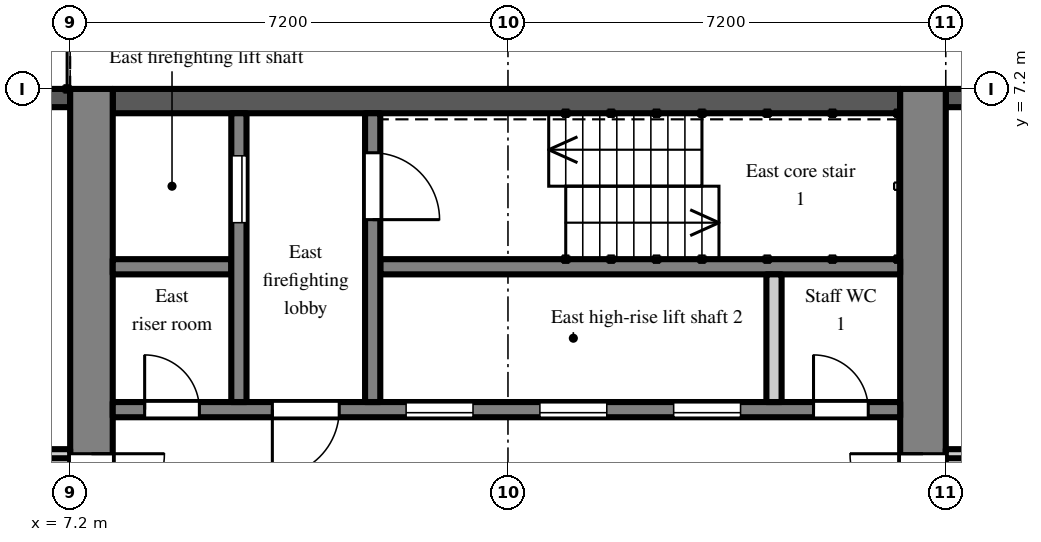
"""IFC4 building model, lengths in metres.
Left out: names, types, materials, properties, quantities, classifications, styles, units other than length and angle.
Written with IfcOpenShell. Run it as: python <this file> out.ifc"""

import sys

from ifc_helpers import new_model, si_unit, direction, frame, frame_2d, origin, place, context, subcontext, project, spatial, rectangle, extrude, element, fill, save


model = new_model("IFC4")
c1 = context("Model", 3, precision=1e-05, world=origin(), true_north=direction((0.0, 1.0)))
c2 = subcontext(c1, "Body", "Model", "MODEL_VIEW")
j1 = project(units=[si_unit("LENGTHUNIT", "METRE"), si_unit("PLANEANGLEUNIT", "RADIAN")], contexts=[c1])
p1 = place(None, origin())
s1 = spatial("IfcSite", under=j1, at=p1, CompositionType="ELEMENT")
p2 = place(p1, origin())
s2 = spatial("IfcBuilding", under=s1, at=p2, CompositionType="ELEMENT")
p3 = place(p2, frame((0.0, 0.0, 198.9)))
s3 = spatial("IfcBuildingStorey", under=s2, at=p3, CompositionType="ELEMENT", Elevation=198.9)
p4 = place(p3, frame((24.3, 7.05, 0.0), z_axis=(0.0, 0.0, 1.0), x_axis=(-1.0, 0.0, 0.0)))
e1 = element("IfcWall", 1, at=p4, inside=s3, PredefinedType="SOLIDWALL", context=c2, shape_type="SweptSolid", body=[
    extrude(rectangle(XDim=2.7, YDim=0.3, at=frame_2d((1.35, 0.0))), origin(), (0.0, 0.0, 1.0), 2.3),
])
p5 = place(p3, frame((7.2, 7.05, 0.0), z_axis=(0.0, 0.0, 1.0), x_axis=(-1.0, 0.0, 0.0)))
e2 = element("IfcWall", 2, at=p5, inside=s3, PredefinedType="SOLIDWALL", context=c2, shape_type="SweptSolid", body=[
    extrude(rectangle(XDim=3.0, YDim=0.3, at=frame_2d((1.5, 0.0))), origin(), (0.0, 0.0, 1.0), 2.3),
])
p6 = place(p3, frame((7.55, -7.2, 0.0), z_axis=(0.0, 0.0, 1.0), x_axis=(0.0, 1.0, 0.0)))
e3 = element("IfcWall", 3, at=p6, inside=s3, PredefinedType="SHEAR", context=c2, shape_type="SweptSolid", body=[
    extrude(rectangle(XDim=14.4, YDim=0.7, at=frame_2d((7.2, 0.0))), origin(), (0.0, 0.0, 1.0), 2.6),
])
p7 = place(p6, frame((6.0, 0.0, 0.0)))
e4 = element("IfcOpeningElement", 4, at=p7, cuts=e3, PredefinedType="OPENING", context=c2, shape_type="SweptSolid", body=[
    extrude(rectangle(XDim=2.4, YDim=2.2, at=frame_2d((1.2, 1.1))), frame((0.0, 0.36, 0.0), z_axis=(0.0, -1.0, 0.0), x_axis=(1.0, 0.0, 0.0)), (0.0, 0.0, 1.0), 0.72),
])
p8 = place(p3, frame((21.225, -7.2, 0.0), z_axis=(0.0, 0.0, 1.0), x_axis=(0.0, 1.0, 0.0)))
e5 = element("IfcWall", 5, at=p8, inside=s3, PredefinedType="SHEAR", context=c2, shape_type="SweptSolid", body=[
    extrude(rectangle(XDim=14.4, YDim=0.75, at=frame_2d((7.2, 0.0))), origin(), (0.0, 0.0, 1.0), 2.6),
])
p9 = place(p8, frame((6.0, 0.0, 0.0)))
e6 = element("IfcOpeningElement", 6, at=p9, cuts=e5, PredefinedType="OPENING", context=c2, shape_type="SweptSolid", body=[
    extrude(rectangle(XDim=2.4, YDim=2.2, at=frame_2d((1.2, 1.1))), frame((0.0, 0.385, 0.0), z_axis=(0.0, -1.0, 0.0), x_axis=(1.0, 0.0, 0.0)), (0.0, 0.0, 1.0), 0.77),
])
p10 = place(p3, frame((7.9, 7.0, 0.0), z_axis=(0.0, 0.0, 1.0), x_axis=(1.0, 0.0, 0.0)))
e7 = element("IfcWall", 7, at=p10, inside=s3, PredefinedType="SHEAR", context=c2, shape_type="SweptSolid", body=[
    extrude(rectangle(XDim=12.95, YDim=0.4, at=frame_2d((6.475, 0.0))), origin(), (0.0, 0.0, 1.0), 2.6),
])
p11 = place(p3, frame((7.9, 1.925, 0.0), z_axis=(0.0, 0.0, 1.0), x_axis=(1.0, 0.0, 0.0)))
e8 = element("IfcWall", 8, at=p11, inside=s3, PredefinedType="SHEAR", context=c2, shape_type="SweptSolid", body=[
    extrude(rectangle(XDim=12.95, YDim=0.25, at=frame_2d((6.475, 0.0))), origin(), (0.0, 0.0, 1.0), 2.6),
])
p12 = place(p11, frame((4.825, 0.0, 0.0)))
e9 = element("IfcOpeningElement", 9, at=p12, cuts=e8, PredefinedType="OPENING", context=c2, shape_type="SweptSolid", body=[
    extrude(rectangle(XDim=1.1, YDim=2.1, at=frame_2d((0.55, 1.05))), frame((0.0, 0.135, 0.0), z_axis=(0.0, -1.0, 0.0), x_axis=(1.0, 0.0, 0.0)), (0.0, 0.0, 1.0), 0.27),
])
p13 = place(p11, frame((7.025, 0.0, 0.0)))
e10 = element("IfcOpeningElement", 10, at=p13, cuts=e8, PredefinedType="OPENING", context=c2, shape_type="SweptSolid", body=[
    extrude(rectangle(XDim=1.1, YDim=2.1, at=frame_2d((0.55, 1.05))), frame((0.0, 0.135, 0.0), z_axis=(0.0, -1.0, 0.0), x_axis=(1.0, 0.0, 0.0)), (0.0, 0.0, 1.0), 0.27),
])
p14 = place(p11, frame((9.225, 0.0, 0.0)))
e11 = element("IfcOpeningElement", 11, at=p14, cuts=e8, PredefinedType="OPENING", context=c2, shape_type="SweptSolid", body=[
    extrude(rectangle(XDim=1.1, YDim=2.1, at=frame_2d((0.55, 1.05))), frame((0.0, 0.135, 0.0), z_axis=(0.0, -1.0, 0.0), x_axis=(1.0, 0.0, 0.0)), (0.0, 0.0, 1.0), 0.27),
])
p15 = place(p11, frame((0.525, 0.0, 0.0)))
e12 = element("IfcOpeningElement", 12, at=p15, cuts=e8, PredefinedType="OPENING", context=c2, shape_type="SweptSolid", body=[
    extrude(rectangle(XDim=0.9, YDim=2.1, at=frame_2d((0.45, 1.05))), frame((0.0, 0.135, 0.0), z_axis=(0.0, -1.0, 0.0), x_axis=(1.0, 0.0, 0.0)), (0.0, 0.0, 1.0), 0.27),
])
p16 = place(p11, frame((2.625, 0.0, 0.0)))
e13 = element("IfcOpeningElement", 13, at=p16, cuts=e8, PredefinedType="OPENING", context=c2, shape_type="SweptSolid", body=[
    extrude(rectangle(XDim=1.1, YDim=2.1, at=frame_2d((0.55, 1.05))), frame((0.0, 0.135, 0.0), z_axis=(0.0, -1.0, 0.0), x_axis=(1.0, 0.0, 0.0)), (0.0, 0.0, 1.0), 0.27),
])
p17 = place(p11, frame((11.525, 0.0, 0.0)))
e14 = element("IfcOpeningElement", 14, at=p17, cuts=e8, PredefinedType="OPENING", context=c2, shape_type="SweptSolid", body=[
    extrude(rectangle(XDim=0.9, YDim=2.1, at=frame_2d((0.45, 1.05))), frame((0.0, 0.135, 0.0), z_axis=(0.0, -1.0, 0.0), x_axis=(1.0, 0.0, 0.0)), (0.0, 0.0, 1.0), 0.27),
])
p18 = place(p3, frame((7.9, 4.275, 0.0), z_axis=(0.0, 0.0, 1.0), x_axis=(1.0, 0.0, 0.0)))
e15 = element("IfcWall", 15, at=p18, inside=s3, PredefinedType="SHEAR", context=c2, shape_type="SweptSolid", body=[
    extrude(rectangle(XDim=1.95, YDim=0.25, at=frame_2d((0.975, 0.0))), origin(), (0.0, 0.0, 1.0), 2.6),
])
p19 = place(p3, frame((12.3, 4.275, 0.0), z_axis=(0.0, 0.0, 1.0), x_axis=(1.0, 0.0, 0.0)))
e16 = element("IfcWall", 16, at=p19, inside=s3, PredefinedType="SHEAR", context=c2, shape_type="SweptSolid", body=[
    extrude(rectangle(XDim=8.55, YDim=0.25, at=frame_2d((4.275, 0.0))), origin(), (0.0, 0.0, 1.0), 2.6),
])
p20 = place(p3, frame((9.975, 2.05, 0.0), z_axis=(0.0, 0.0, 1.0), x_axis=(0.0, 1.0, 0.0)))
e17 = element("IfcWall", 17, at=p20, inside=s3, PredefinedType="SHEAR", context=c2, shape_type="SweptSolid", body=[
    extrude(rectangle(XDim=4.75, YDim=0.25, at=frame_2d((2.375, 0.0))), origin(), (0.0, 0.0, 1.0), 2.6),
])
p21 = place(p20, frame((2.95, 0.0, 0.0)))
e18 = element("IfcOpeningElement", 18, at=p21, cuts=e17, PredefinedType="OPENING", context=c2, shape_type="SweptSolid", body=[
    extrude(rectangle(XDim=1.1, YDim=2.1, at=frame_2d((0.55, 1.05))), frame((0.0, 0.135, 0.0), z_axis=(0.0, -1.0, 0.0), x_axis=(1.0, 0.0, 0.0)), (0.0, 0.0, 1.0), 0.27),
])
p22 = place(p3, frame((12.175, 2.05, 0.0), z_axis=(0.0, 0.0, 1.0), x_axis=(0.0, 1.0, 0.0)))
e19 = element("IfcWall", 19, at=p22, inside=s3, PredefinedType="SHEAR", context=c2, shape_type="SweptSolid", body=[
    extrude(rectangle(XDim=4.75, YDim=0.25, at=frame_2d((2.375, 0.0))), origin(), (0.0, 0.0, 1.0), 2.6),
])
p23 = place(p22, frame((3.0, 0.0, 0.0)))
e20 = element("IfcOpeningElement", 20, at=p23, cuts=e19, PredefinedType="OPENING", context=c2, shape_type="SweptSolid", body=[
    extrude(rectangle(XDim=1.1, YDim=2.1, at=frame_2d((0.55, 1.05))), frame((0.0, 0.135, 0.0), z_axis=(0.0, -1.0, 0.0), x_axis=(1.0, 0.0, 0.0)), (0.0, 0.0, 1.0), 0.27),
])
p24 = place(p3, frame((18.775, 2.05, 0.0), z_axis=(0.0, 0.0, 1.0), x_axis=(0.0, 1.0, 0.0)))
e21 = element("IfcWall", 21, at=p24, inside=s3, PredefinedType="PARTITIONING", context=c2, shape_type="SweptSolid", body=[
    extrude(rectangle(XDim=2.1, YDim=0.25, at=frame_2d((1.05, 0.0))), origin(), (0.0, 0.0, 1.0), 2.6),
])
p25 = place(p3, frame((1.275, 1.2, 0.0), z_axis=(0.0, 0.0, 1.0), x_axis=(1.0, 0.0, 0.0)))
e22 = element("IfcWall", 22, at=p25, inside=s3, PredefinedType="PARTITIONING", context=c2, shape_type="SweptSolid", body=[
    extrude(rectangle(XDim=5.925, YDim=0.15, at=frame_2d((2.962, 0.0))), origin(), (0.0, 0.0, 1.0), 2.6),
])
p26 = place(p25, frame((3.975, 0.0, 0.0)))
e23 = element("IfcOpeningElement", 23, at=p26, cuts=e22, PredefinedType="OPENING", context=c2, shape_type="SweptSolid", body=[
    extrude(rectangle(XDim=0.9, YDim=2.1, at=frame_2d((0.45, 1.05))), frame((0.0, 0.085, 0.0), z_axis=(0.0, -1.0, 0.0), x_axis=(1.0, 0.0, 0.0)), (0.0, 0.0, 1.0), 0.17),
])
p27 = place(p3, frame((21.6, 1.2, 0.0), z_axis=(0.0, 0.0, 1.0), x_axis=(1.0, 0.0, 0.0)))
e24 = element("IfcWall", 24, at=p27, inside=s3, PredefinedType="PARTITIONING", context=c2, shape_type="SweptSolid", body=[
    extrude(rectangle(XDim=3.525, YDim=0.15, at=frame_2d((1.762, 0.0))), origin(), (0.0, 0.0, 1.0), 2.6),
])
p28 = place(p27, frame((0.9, 0.0, 0.0)))
e25 = element("IfcOpeningElement", 25, at=p28, cuts=e24, PredefinedType="OPENING", context=c2, shape_type="SweptSolid", body=[
    extrude(rectangle(XDim=1.8, YDim=2.1, at=frame_2d((0.9, 1.05))), frame((0.0, 0.085, 0.0), z_axis=(0.0, -1.0, 0.0), x_axis=(1.0, 0.0, 0.0)), (0.0, 0.0, 1.0), 0.17),
])
p29 = place(p12, origin())
e26 = element("IfcDoor", 26, at=p29, inside=s3, OperationType="SLIDING_TO_LEFT", PredefinedType="DOOR", context=c2, shape_type="SweptSolid", body=[
    extrude(rectangle(XDim=1.1, YDim=2.1, at=frame_2d((0.55, 1.05))), frame((0.0, 0.025, 0.0), z_axis=(0.0, -1.0, 0.0), x_axis=(1.0, 0.0, 0.0)), (0.0, 0.0, 1.0), 0.05),
])
fill(e9, e26)
p30 = place(p13, origin())
e27 = element("IfcDoor", 27, at=p30, inside=s3, OperationType="SLIDING_TO_LEFT", PredefinedType="DOOR", context=c2, shape_type="SweptSolid", body=[
    extrude(rectangle(XDim=1.1, YDim=2.1, at=frame_2d((0.55, 1.05))), frame((0.0, 0.025, 0.0), z_axis=(0.0, -1.0, 0.0), x_axis=(1.0, 0.0, 0.0)), (0.0, 0.0, 1.0), 0.05),
])
fill(e10, e27)
p31 = place(p14, origin())
e28 = element("IfcDoor", 28, at=p31, inside=s3, OperationType="SLIDING_TO_LEFT", PredefinedType="DOOR", context=c2, shape_type="SweptSolid", body=[
    extrude(rectangle(XDim=1.1, YDim=2.1, at=frame_2d((0.55, 1.05))), frame((0.0, 0.025, 0.0), z_axis=(0.0, -1.0, 0.0), x_axis=(1.0, 0.0, 0.0)), (0.0, 0.0, 1.0), 0.05),
])
fill(e11, e28)
p32 = place(p21, origin())
e29 = element("IfcDoor", 29, at=p32, inside=s3, OperationType="SLIDING_TO_LEFT", PredefinedType="DOOR", context=c2, shape_type="SweptSolid", body=[
    extrude(rectangle(XDim=1.1, YDim=2.1, at=frame_2d((0.55, 1.05))), frame((0.0, 0.025, 0.0), z_axis=(0.0, -1.0, 0.0), x_axis=(1.0, 0.0, 0.0)), (0.0, 0.0, 1.0), 0.05),
])
fill(e18, e29)
p33 = place(p23, frame((1.1, 0.0, 0.0), z_axis=(0.0, 0.0, 1.0), x_axis=(-1.0, 0.0, 0.0)))
e30 = element("IfcDoor", 30, at=p33, inside=s3, OperationType="SINGLE_SWING_RIGHT", PredefinedType="DOOR", context=c2, shape_type="SweptSolid", body=[
    extrude(rectangle(XDim=1.1, YDim=2.1, at=frame_2d((0.55, 1.05))), frame((0.0, 0.025, 0.0), z_axis=(0.0, -1.0, 0.0), x_axis=(1.0, 0.0, 0.0)), (0.0, 0.0, 1.0), 0.05),
])
fill(e20, e30)
p34 = place(p15, origin())
e31 = element("IfcDoor", 31, at=p34, inside=s3, OperationType="SINGLE_SWING_LEFT", PredefinedType="DOOR", context=c2, shape_type="SweptSolid", body=[
    extrude(rectangle(XDim=0.9, YDim=2.1, at=frame_2d((0.45, 1.05))), frame((0.0, 0.025, 0.0), z_axis=(0.0, -1.0, 0.0), x_axis=(1.0, 0.0, 0.0)), (0.0, 0.0, 1.0), 0.05),
])
fill(e12, e31)
p35 = place(p16, frame((1.1, 0.0, 0.0), z_axis=(0.0, 0.0, 1.0), x_axis=(-1.0, 0.0, 0.0)))
e32 = element("IfcDoor", 32, at=p35, inside=s3, OperationType="SINGLE_SWING_RIGHT", PredefinedType="DOOR", context=c2, shape_type="SweptSolid", body=[
    extrude(rectangle(XDim=1.1, YDim=2.1, at=frame_2d((0.55, 1.05))), frame((0.0, 0.025, 0.0), z_axis=(0.0, -1.0, 0.0), x_axis=(1.0, 0.0, 0.0)), (0.0, 0.0, 1.0), 0.05),
])
fill(e13, e32)
p36 = place(p7, frame((2.4, 0.0, 0.0), z_axis=(0.0, 0.0, 1.0), x_axis=(-1.0, 0.0, 0.0)))
e33 = element("IfcDoor", 33, at=p36, inside=s3, OperationType="DOUBLE_DOOR_DOUBLE_SWING", PredefinedType="DOOR", context=c2, shape_type="SweptSolid", body=[
    extrude(rectangle(XDim=2.4, YDim=2.2, at=frame_2d((1.2, 1.1))), frame((0.0, 0.025, 0.0), z_axis=(0.0, -1.0, 0.0), x_axis=(1.0, 0.0, 0.0)), (0.0, 0.0, 1.0), 0.05),
])
fill(e4, e33)
p37 = place(p9, origin())
e34 = element("IfcDoor", 34, at=p37, inside=s3, OperationType="DOUBLE_DOOR_DOUBLE_SWING", PredefinedType="DOOR", context=c2, shape_type="SweptSolid", body=[
    extrude(rectangle(XDim=2.4, YDim=2.2, at=frame_2d((1.2, 1.1))), frame((0.0, 0.025, 0.0), z_axis=(0.0, -1.0, 0.0), x_axis=(1.0, 0.0, 0.0)), (0.0, 0.0, 1.0), 0.05),
])
fill(e6, e34)
p38 = place(p17, origin())
e35 = element("IfcDoor", 35, at=p38, inside=s3, OperationType="SINGLE_SWING_LEFT", PredefinedType="DOOR", context=c2, shape_type="SweptSolid", body=[
    extrude(rectangle(XDim=0.9, YDim=2.1, at=frame_2d((0.45, 1.05))), frame((0.0, 0.025, 0.0), z_axis=(0.0, -1.0, 0.0), x_axis=(1.0, 0.0, 0.0)), (0.0, 0.0, 1.0), 0.05),
])
fill(e14, e35)
save(model, sys.argv[1])
